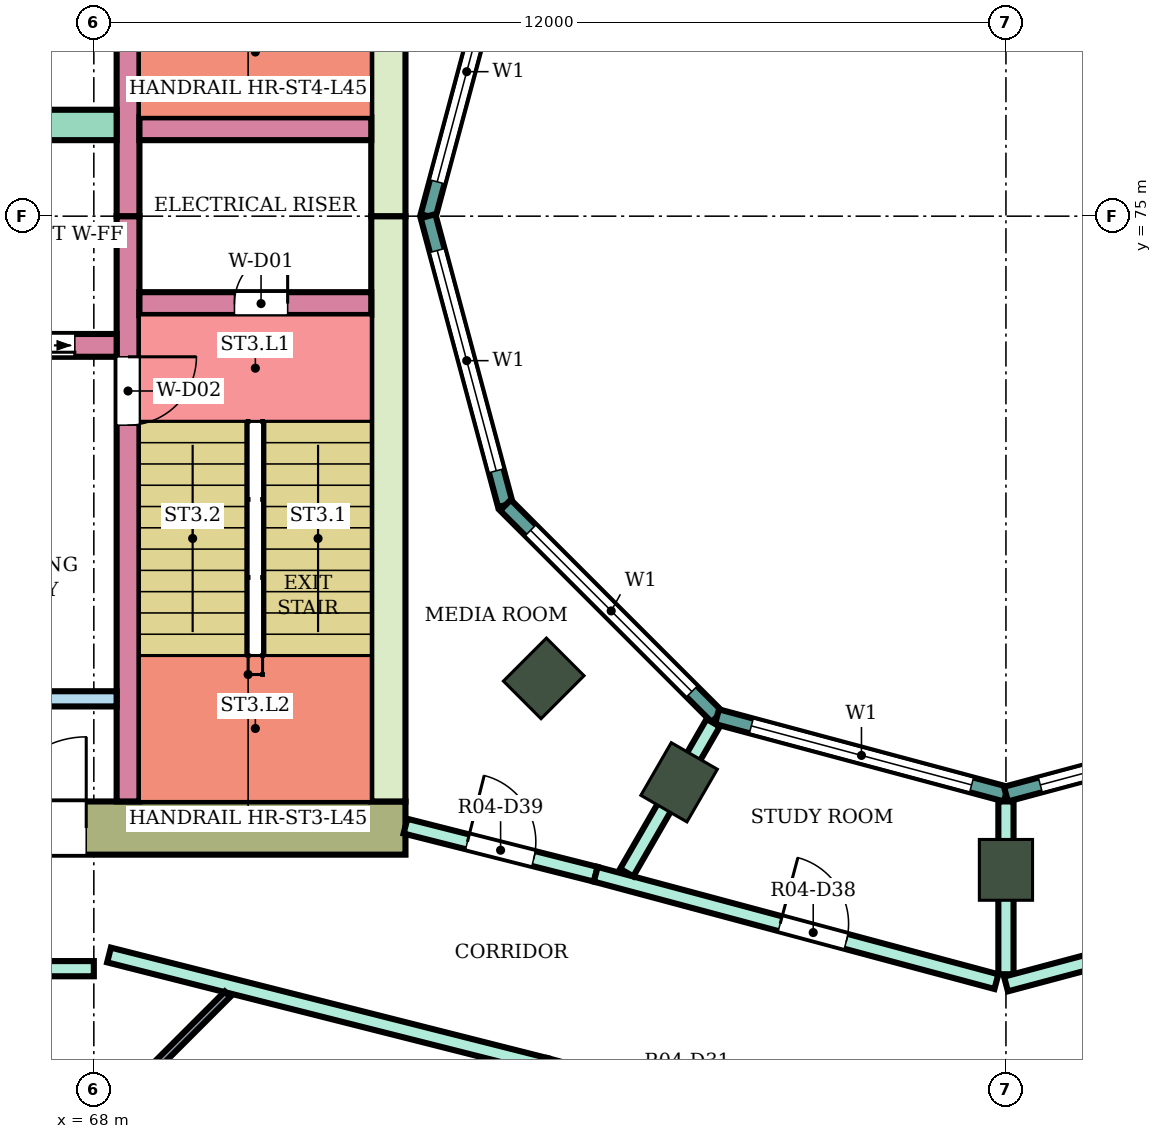
"""IFC4 building model, lengths in metres.
Left out: names, types, materials, properties, quantities, classifications, styles, units other than length and angle.
Written with IfcOpenShell. Run it as: python <this file> out.ifc"""

import sys

from ifc_helpers import new_model, si_unit, direction, frame, frame_2d, origin, origin_2d, place, context, subcontext, project, spatial, rectangle, extrude, element, fill, save


model = new_model("IFC4")
c1 = context("Model", 3, precision=1e-05, world=origin(), true_north=direction((0.0, 1.0)))
c2 = subcontext(c1, "Body", "Model", "MODEL_VIEW")
j1 = project(units=[si_unit("LENGTHUNIT", "METRE"), si_unit("PLANEANGLEUNIT", "RADIAN")], contexts=[c1])
p1 = place(None, origin())
s1 = spatial("IfcSite", under=j1, at=p1, CompositionType="ELEMENT")
p2 = place(p1, origin())
s2 = spatial("IfcBuilding", under=s1, at=p2, CompositionType="ELEMENT")
p3 = place(p2, frame((0.0, 0.0, 194.6)))
s3 = spatial("IfcBuildingStorey", under=s2, at=p3, CompositionType="ELEMENT", Elevation=194.6)
for number, where, z_axis, x_axis in (
    (1, (73.919, 68.919, 0.0), (0.0, 0.0, 1.0), (-0.707, -0.707, 0.0)),
    (2, (75.7, 67.552, 0.0), (0.0, 0.0, 1.0), (-0.5, -0.866, 0.0)),
    (3, (80.0, 66.4, 0.0), (0.0, 0.0, 1.0), (0.0, -1.0, 0.0)),
):
    element("IfcColumn", number, at=place(p3, frame(where, z_axis=z_axis, x_axis=x_axis)), inside=s3, PredefinedType="COLUMN", context=c2, shape_type="SweptSolid", body=[
        extrude(rectangle(XDim=0.8, YDim=0.7, at=origin_2d()), origin(), (0.0, 0.0, 1.0), 4.1),
    ])
p4 = place(p3, frame((72.1, 66.95, 0.0), z_axis=(0.0, 0.0, 1.0), x_axis=(-1.0, 0.0, 0.0)))
e4 = element("IfcWall", 4, at=p4, inside=s3, PredefinedType="SHEAR", context=c2, shape_type="SweptSolid", body=[
    extrude(rectangle(XDim=14.8, YDim=0.7, at=frame_2d((7.4, 0.0))), origin(), (0.0, 0.0, 1.0), 3.78),
])
p5 = place(p4, frame((4.2, 0.0, 0.0)))
e5 = element("IfcOpeningElement", 5, at=p5, cuts=e4, PredefinedType="OPENING", context=c2, shape_type="SweptSolid", body=[
    extrude(rectangle(XDim=2.4, YDim=2.4, at=frame_2d((1.2, 1.2))), frame((0.0, 0.36, 0.0), z_axis=(0.0, -1.0, 0.0), x_axis=(1.0, 0.0, 0.0)), (0.0, 0.0, 1.0), 0.72),
])
for number, where, z_axis, x_axis in (
    (6, (71.875, 75.0, 0.0), (0.0, 0.0, 1.0), (0.0, -1.0, 0.0)),
    (7, (71.875, 82.7, 0.0), (0.0, 0.0, 1.0), (0.0, -1.0, 0.0)),
):
    element("IfcWall", number, at=place(p3, frame(where, z_axis=z_axis, x_axis=x_axis)), inside=s3, PredefinedType="SHEAR", context=c2, shape_type="SweptSolid", body=[
        extrude(rectangle(XDim=7.7, YDim=0.45, at=frame_2d((3.85, 0.0))), origin(), (0.0, 0.0, 1.0), 3.78),
    ])
p6 = place(p3, frame((68.45, 75.0, 0.0), z_axis=(0.0, 0.0, 1.0), x_axis=(0.0, -1.0, 0.0)))
e8 = element("IfcWall", 8, at=p6, inside=s3, PredefinedType="SHEAR", context=c2, shape_type="SweptSolid", body=[
    extrude(rectangle(XDim=7.7, YDim=0.3, at=frame_2d((3.85, 0.0))), origin(), (0.0, 0.0, 1.0), 3.78),
])
p7 = place(p6, frame((1.85, 0.0, 0.0)))
e9 = element("IfcOpeningElement", 9, at=p7, cuts=e8, PredefinedType="OPENING", context=c2, shape_type="SweptSolid", body=[
    extrude(rectangle(XDim=0.9, YDim=2.1, at=frame_2d((0.45, 1.05))), frame((0.0, 0.16, 0.0), z_axis=(0.0, -1.0, 0.0), x_axis=(1.0, 0.0, 0.0)), (0.0, 0.0, 1.0), 0.32),
])
p8 = place(p3, frame((68.45, 82.7, 0.0), z_axis=(0.0, 0.0, 1.0), x_axis=(0.0, -1.0, 0.0)))
e10 = element("IfcWall", 10, at=p8, inside=s3, PredefinedType="SHEAR", context=c2, shape_type="SweptSolid", body=[
    extrude(rectangle(XDim=7.7, YDim=0.3, at=frame_2d((3.85, 0.0))), origin(), (0.0, 0.0, 1.0), 3.78),
])
p9 = place(p8, frame((0.35, 0.0, 0.0)))
e11 = element("IfcOpeningElement", 11, at=p9, cuts=e10, PredefinedType="OPENING", context=c2, shape_type="SweptSolid", body=[
    extrude(rectangle(XDim=0.9, YDim=2.1, at=frame_2d((0.45, 1.05))), frame((0.0, 0.16, 0.0), z_axis=(0.0, -1.0, 0.0), x_axis=(1.0, 0.0, 0.0)), (0.0, 0.0, 1.0), 0.32),
])
p10 = place(p3, frame((71.65, 73.85, 0.0), z_axis=(0.0, 0.0, 1.0), x_axis=(-1.0, 0.0, 0.0)))
e12 = element("IfcWall", 12, at=p10, inside=s3, PredefinedType="SHEAR", context=c2, shape_type="SweptSolid", body=[
    extrude(rectangle(XDim=3.05, YDim=0.3, at=frame_2d((1.525, 0.0))), origin(), (0.0, 0.0, 1.0), 3.78),
])
p11 = place(p10, frame((1.1, 0.0, 0.0)))
e13 = element("IfcOpeningElement", 13, at=p11, cuts=e12, PredefinedType="OPENING", context=c2, shape_type="SweptSolid", body=[
    extrude(rectangle(XDim=0.7, YDim=2.0, at=frame_2d((0.35, 1.0))), frame((0.0, 0.16, 0.0), z_axis=(0.0, -1.0, 0.0), x_axis=(1.0, 0.0, 0.0)), (0.0, 0.0, 1.0), 0.32),
])
p12 = place(p3, frame((71.65, 76.15, 0.0), z_axis=(0.0, 0.0, 1.0), x_axis=(-1.0, 0.0, 0.0)))
e14 = element("IfcWall", 14, at=p12, inside=s3, PredefinedType="SHEAR", context=c2, shape_type="SweptSolid", body=[
    extrude(rectangle(XDim=3.05, YDim=0.3, at=frame_2d((1.525, 0.0))), origin(), (0.0, 0.0, 1.0), 3.78),
])
p13 = place(p3, frame((68.3, 73.3, 0.0), z_axis=(0.0, 0.0, 1.0), x_axis=(-1.0, 0.0, 0.0)))
e15 = element("IfcWall", 15, at=p13, inside=s3, PredefinedType="SHEAR", context=c2, shape_type="SweptSolid", body=[
    extrude(rectangle(XDim=11.0, YDim=0.3, at=frame_2d((5.5, 0.0))), origin(), (0.0, 0.0, 1.0), 3.78),
])
p14 = place(p13, frame((0.55, 0.0, 0.0)))
e16 = element("IfcOpeningElement", 16, at=p14, cuts=e15, PredefinedType="OPENING", context=c2, shape_type="SweptSolid", body=[
    extrude(rectangle(XDim=1.1, YDim=2.1, at=frame_2d((0.55, 1.05))), frame((0.0, 0.16, 0.0), z_axis=(0.0, -1.0, 0.0), x_axis=(1.0, 0.0, 0.0)), (0.0, 0.0, 1.0), 0.32),
])
p15 = place(p13, frame((3.0, 0.0, 0.0)))
e17 = element("IfcOpeningElement", 17, at=p15, cuts=e15, PredefinedType="OPENING", context=c2, shape_type="SweptSolid", body=[
    extrude(rectangle(XDim=1.2, YDim=2.1, at=frame_2d((0.6, 1.05))), frame((0.0, 0.16, 0.0), z_axis=(0.0, -1.0, 0.0), x_axis=(1.0, 0.0, 0.0)), (0.0, 0.0, 1.0), 0.32),
])
p16 = place(p13, frame((5.5, 0.0, 0.0)))
e18 = element("IfcOpeningElement", 18, at=p16, cuts=e15, PredefinedType="OPENING", context=c2, shape_type="SweptSolid", body=[
    extrude(rectangle(XDim=1.2, YDim=2.1, at=frame_2d((0.6, 1.05))), frame((0.0, 0.16, 0.0), z_axis=(0.0, -1.0, 0.0), x_axis=(1.0, 0.0, 0.0)), (0.0, 0.0, 1.0), 0.32),
])
p17 = place(p13, frame((8.8, 0.0, 0.0)))
e19 = element("IfcOpeningElement", 19, at=p17, cuts=e15, PredefinedType="OPENING", context=c2, shape_type="SweptSolid", body=[
    extrude(rectangle(XDim=0.9, YDim=2.1, at=frame_2d((0.45, 1.05))), frame((0.0, 0.16, 0.0), z_axis=(0.0, -1.0, 0.0), x_axis=(1.0, 0.0, 0.0)), (0.0, 0.0, 1.0), 0.32),
])
p18 = place(p3, frame((68.3, 76.2, 0.0), z_axis=(0.0, 0.0, 1.0), x_axis=(-1.0, 0.0, 0.0)))
e20 = element("IfcWall", 20, at=p18, inside=s3, PredefinedType="SHEAR", context=c2, shape_type="SweptSolid", body=[
    extrude(rectangle(XDim=11.0, YDim=0.4, at=frame_2d((5.5, 0.0))), origin(), (0.0, 0.0, 1.0), 3.78),
])
p19 = place(p3, frame((68.3, 68.65, 0.0), z_axis=(0.0, 0.0, 1.0), x_axis=(-1.0, 0.0, 0.0)))
e21 = element("IfcWall", 21, at=p19, inside=s3, PredefinedType="SHEAR", context=c2, shape_type="SweptSolid", body=[
    extrude(rectangle(XDim=4.5, YDim=0.2, at=frame_2d((2.25, 0.0))), origin(), (0.0, 0.0, 1.0), 3.78),
])
p20 = place(p3, frame((73.415, 78.802, 0.0), z_axis=(0.0, 0.0, 1.0), x_axis=(-0.258789828301, -0.965933654434, 0.0)))
e22 = element("IfcWall", 22, at=p20, inside=s3, PredefinedType="NOTDEFINED", context=c2, shape_type="SweptSolid", body=[
    extrude(rectangle(XDim=3.936, YDim=0.2, at=frame_2d((1.968, 0.0))), origin(), (0.0, 0.0, 1.0), 4.1),
])
p21 = place(p20, frame((0.468, 0.0, 0.9)))
e23 = element("IfcOpeningElement", 23, at=p21, cuts=e22, PredefinedType="OPENING", context=c2, shape_type="SweptSolid", body=[
    extrude(rectangle(XDim=3.0, YDim=2.3, at=frame_2d((1.5, 1.15))), frame((0.0, 0.11, 0.0), z_axis=(0.0, -1.0, 0.0), x_axis=(1.0, 0.0, 0.0)), (0.0, 0.0, 1.0), 0.22),
])
p22 = place(p3, frame((72.396, 75.0, 0.0), z_axis=(0.0, 0.0, 1.0), x_axis=(0.258789828301, -0.965933654434, 0.0)))
e24 = element("IfcWall", 24, at=p22, inside=s3, PredefinedType="NOTDEFINED", context=c2, shape_type="SweptSolid", body=[
    extrude(rectangle(XDim=3.936, YDim=0.2, at=frame_2d((1.968, 0.0))), origin(), (0.0, 0.0, 1.0), 4.1),
])
p23 = place(p22, frame((0.468, 0.0, 0.9)))
e25 = element("IfcOpeningElement", 25, at=p23, cuts=e24, PredefinedType="OPENING", context=c2, shape_type="SweptSolid", body=[
    extrude(rectangle(XDim=3.0, YDim=2.3, at=frame_2d((1.5, 1.15))), frame((0.0, 0.11, 0.0), z_axis=(0.0, -1.0, 0.0), x_axis=(1.0, 0.0, 0.0)), (0.0, 0.0, 1.0), 0.22),
])
p24 = place(p3, frame((73.415, 71.198, 0.0), z_axis=(0.0, 0.0, 1.0), x_axis=(0.707106781187, -0.707106781187, 0.0)))
e26 = element("IfcWall", 26, at=p24, inside=s3, PredefinedType="NOTDEFINED", context=c2, shape_type="SweptSolid", body=[
    extrude(rectangle(XDim=3.936, YDim=0.2, at=frame_2d((1.968, 0.0))), origin(), (0.0, 0.0, 1.0), 4.1),
])
p25 = place(p24, frame((0.468, 0.0, 0.9)))
e27 = element("IfcOpeningElement", 27, at=p25, cuts=e26, PredefinedType="OPENING", context=c2, shape_type="SweptSolid", body=[
    extrude(rectangle(XDim=3.0, YDim=2.3, at=frame_2d((1.5, 1.15))), frame((0.0, 0.11, 0.0), z_axis=(0.0, -1.0, 0.0), x_axis=(1.0, 0.0, 0.0)), (0.0, 0.0, 1.0), 0.22),
])
p26 = place(p3, frame((76.198, 68.415, 0.0), z_axis=(0.0, 0.0, 1.0), x_axis=(0.965933654434, -0.258789828301, 0.0)))
e28 = element("IfcWall", 28, at=p26, inside=s3, PredefinedType="NOTDEFINED", context=c2, shape_type="SweptSolid", body=[
    extrude(rectangle(XDim=3.936, YDim=0.2, at=frame_2d((1.968, 0.0))), origin(), (0.0, 0.0, 1.0), 4.1),
])
p27 = place(p26, frame((0.468, 0.0, 0.9)))
e29 = element("IfcOpeningElement", 29, at=p27, cuts=e28, PredefinedType="OPENING", context=c2, shape_type="SweptSolid", body=[
    extrude(rectangle(XDim=3.0, YDim=2.3, at=frame_2d((1.5, 1.15))), frame((0.0, 0.11, 0.0), z_axis=(0.0, -1.0, 0.0), x_axis=(1.0, 0.0, 0.0)), (0.0, 0.0, 1.0), 0.22),
])
p28 = place(p3, frame((80.0, 67.396, 0.0), z_axis=(0.0, 0.0, 1.0), x_axis=(0.965933654434, 0.258789828301, 0.0)))
e30 = element("IfcWall", 30, at=p28, inside=s3, PredefinedType="NOTDEFINED", context=c2, shape_type="SweptSolid", body=[
    extrude(rectangle(XDim=3.936, YDim=0.2, at=frame_2d((1.968, 0.0))), origin(), (0.0, 0.0, 1.0), 4.1),
])
p29 = place(p28, frame((0.468, 0.0, 0.9)))
e31 = element("IfcOpeningElement", 31, at=p29, cuts=e30, PredefinedType="OPENING", context=c2, shape_type="SweptSolid", body=[
    extrude(rectangle(XDim=3.0, YDim=2.3, at=frame_2d((1.5, 1.15))), frame((0.0, 0.11, 0.0), z_axis=(0.0, -1.0, 0.0), x_axis=(1.0, 0.0, 0.0)), (0.0, 0.0, 1.0), 0.22),
])
p30 = place(p3, frame((65.2, 65.1, 0.0), z_axis=(0.0, 0.0, 1.0), x_axis=(1.0, 0.0, 0.0)))
e32 = element("IfcWall", 32, at=p30, inside=s3, PredefinedType="PARTITIONING", context=c2, shape_type="SweptSolid", body=[
    extrude(rectangle(XDim=2.8, YDim=0.2, at=frame_2d((1.4, 0.0))), origin(), (0.0, 0.0, 1.0), 3.65),
])
p31 = place(p3, frame((68.2, 65.28, 0.0), z_axis=(0.0, 0.0, 1.0), x_axis=(0.969450596516, -0.245286650503, 0.0)))
e33 = element("IfcWall", 33, at=p31, inside=s3, PredefinedType="PARTITIONING", context=c2, shape_type="SweptSolid", body=[
    extrude(rectangle(XDim=5.928, YDim=0.2, at=frame_2d((2.964, 0.0))), origin(), (0.0, 0.0, 1.0), 3.65),
])
p32 = place(p3, frame((72.1, 66.975, 0.0), z_axis=(0.0, 0.0, 1.0), x_axis=(0.969471314457, -0.245204752086, 0.0)))
e34 = element("IfcWall", 34, at=p32, inside=s3, PredefinedType="PARTITIONING", context=c2, shape_type="SweptSolid", body=[
    extrude(rectangle(XDim=2.582, YDim=0.2, at=frame_2d((1.291, 0.0))), origin(), (0.0, 0.0, 1.0), 3.65),
])
p33 = place(p32, frame((0.841, 0.0, 0.0)))
e35 = element("IfcOpeningElement", 35, at=p33, cuts=e34, PredefinedType="OPENING", context=c2, shape_type="SweptSolid", body=[
    extrude(rectangle(XDim=0.9, YDim=2.1, at=frame_2d((0.45, 1.05))), frame((0.0, 0.11, 0.0), z_axis=(0.0, -1.0, 0.0), x_axis=(1.0, 0.0, 0.0)), (0.0, 0.0, 1.0), 0.22),
])
p34 = place(p3, frame((73.947, 63.826, 0.0), z_axis=(0.0, 0.0, 1.0), x_axis=(0.965908253407, -0.258884619088, 0.0)))
e36 = element("IfcWall", 36, at=p34, inside=s3, PredefinedType="PARTITIONING", context=c2, shape_type="SweptSolid", body=[
    extrude(rectangle(XDim=6.217, YDim=0.2, at=frame_2d((3.108, 0.0))), origin(), (0.0, 0.0, 1.0), 3.65),
])
p35 = place(p34, frame((1.424, 0.0, 0.0)))
e37 = element("IfcOpeningElement", 37, at=p35, cuts=e36, PredefinedType="OPENING", context=c2, shape_type="SweptSolid", body=[
    extrude(rectangle(XDim=1.0, YDim=2.1, at=frame_2d((0.5, 1.05))), frame((0.0, 0.11, 0.0), z_axis=(0.0, -1.0, 0.0), x_axis=(1.0, 0.0, 0.0)), (0.0, 0.0, 1.0), 0.22),
])
p36 = place(p3, frame((74.603, 66.342, 0.0), z_axis=(0.0, 0.0, 1.0), x_axis=(0.965920893652, -0.258837453254, 0.0)))
e38 = element("IfcWall", 38, at=p36, inside=s3, PredefinedType="PARTITIONING", context=c2, shape_type="SweptSolid", body=[
    extrude(rectangle(XDim=5.458, YDim=0.2, at=frame_2d((2.729, 0.0))), origin(), (0.0, 0.0, 1.0), 3.65),
])
p37 = place(p36, frame((2.512, 0.0, 0.0)))
e39 = element("IfcOpeningElement", 39, at=p37, cuts=e38, PredefinedType="OPENING", context=c2, shape_type="SweptSolid", body=[
    extrude(rectangle(XDim=0.9, YDim=2.1, at=frame_2d((0.45, 1.05))), frame((0.0, 0.11, 0.0), z_axis=(0.0, -1.0, 0.0), x_axis=(1.0, 0.0, 0.0)), (0.0, 0.0, 1.0), 0.22),
])
p38 = place(p3, frame((75.01, 66.364, 0.0), z_axis=(0.0, 0.0, 1.0), x_axis=(0.500097042406, 0.865969369075, 0.0)))
e40 = element("IfcWall", 40, at=p38, inside=s3, PredefinedType="PARTITIONING", context=c2, shape_type="SweptSolid", body=[
    extrude(rectangle(XDim=2.275, YDim=0.2, at=frame_2d((1.138, 0.0))), origin(), (0.0, 0.0, 1.0), 3.65),
])
p39 = place(p3, frame((80.048, 62.217, 0.0), z_axis=(0.0, 0.0, 1.0), x_axis=(0.966097920642, 0.258175923996, 0.0)))
e41 = element("IfcWall", 41, at=p39, inside=s3, PredefinedType="PARTITIONING", context=c2, shape_type="SweptSolid", body=[
    extrude(rectangle(XDim=6.217, YDim=0.2, at=frame_2d((3.108, 0.0))), origin(), (0.0, 0.0, 1.0), 3.65),
])
p40 = place(p39, frame((3.792, 0.0, 0.0)))
e42 = element("IfcOpeningElement", 42, at=p40, cuts=e41, PredefinedType="OPENING", context=c2, shape_type="SweptSolid", body=[
    extrude(rectangle(XDim=1.0, YDim=2.1, at=frame_2d((0.5, 1.05))), frame((0.0, 0.11, 0.0), z_axis=(0.0, -1.0, 0.0), x_axis=(1.0, 0.0, 0.0)), (0.0, 0.0, 1.0), 0.22),
])
p41 = place(p3, frame((80.0, 65.027, 0.0), z_axis=(0.0, 0.0, 1.0), x_axis=(0.0, 1.0, 0.0)))
e43 = element("IfcWall", 43, at=p41, inside=s3, PredefinedType="PARTITIONING", context=c2, shape_type="SweptSolid", body=[
    extrude(rectangle(XDim=2.273, YDim=0.2, at=frame_2d((1.136, 0.0))), origin(), (0.0, 0.0, 1.0), 3.65),
])
p42 = place(p3, frame((80.0, 64.898, 0.0), z_axis=(0.0, 0.0, 1.0), x_axis=(0.966236923997, 0.25765520896, 0.0)))
e44 = element("IfcWall", 44, at=p42, inside=s3, PredefinedType="PARTITIONING", context=c2, shape_type="SweptSolid", body=[
    extrude(rectangle(XDim=8.168, YDim=0.2, at=frame_2d((4.084, 0.0))), origin(), (0.0, 0.0, 1.0), 3.65),
])
p43 = place(p42, frame((1.893, 0.0, 0.0)))
e45 = element("IfcOpeningElement", 45, at=p43, cuts=e44, PredefinedType="OPENING", context=c2, shape_type="SweptSolid", body=[
    extrude(rectangle(XDim=1.8, YDim=2.1, at=frame_2d((0.9, 1.05))), frame((0.0, 0.11, 0.0), z_axis=(0.0, -1.0, 0.0), x_axis=(1.0, 0.0, 0.0)), (0.0, 0.0, 1.0), 0.22),
])
p44 = place(p3, frame((63.592, 58.6, 0.0), z_axis=(0.0, 0.0, 1.0), x_axis=(0.707260766325, 0.706952762508, 0.0)))
e46 = element("IfcWall", 46, at=p44, inside=s3, PredefinedType="PARTITIONING", context=c2, shape_type="SweptSolid", body=[
    extrude(rectangle(XDim=8.719, YDim=0.1, at=frame_2d((4.36, 0.0))), origin(), (0.0, 0.0, 1.0), 3.65),
])
p45 = place(p44, frame((1.772, 0.0, 0.0)))
e47 = element("IfcOpeningElement", 47, at=p45, cuts=e46, PredefinedType="OPENING", context=c2, shape_type="SweptSolid", body=[
    extrude(rectangle(XDim=0.9, YDim=2.1, at=frame_2d((0.45, 1.05))), frame((0.0, 0.06, 0.0), z_axis=(0.0, -1.0, 0.0), x_axis=(1.0, 0.0, 0.0)), (0.0, 0.0, 1.0), 0.12),
])
p46 = place(p21, origin())
e48 = element("IfcWindow", 48, at=p46, inside=s3, PartitioningType="SINGLE_PANEL", PredefinedType="WINDOW", context=c2, shape_type="SweptSolid", body=[
    extrude(rectangle(XDim=3.0, YDim=2.3, at=frame_2d((1.5, 1.15))), frame((0.0, 0.03, 0.0), z_axis=(0.0, -1.0, 0.0), x_axis=(1.0, 0.0, 0.0)), (0.0, 0.0, 1.0), 0.06),
])
fill(e23, e48)
p47 = place(p23, origin())
e49 = element("IfcWindow", 49, at=p47, inside=s3, PartitioningType="SINGLE_PANEL", PredefinedType="WINDOW", context=c2, shape_type="SweptSolid", body=[
    extrude(rectangle(XDim=3.0, YDim=2.3, at=frame_2d((1.5, 1.15))), frame((0.0, 0.03, 0.0), z_axis=(0.0, -1.0, 0.0), x_axis=(1.0, 0.0, 0.0)), (0.0, 0.0, 1.0), 0.06),
])
fill(e25, e49)
p48 = place(p25, origin())
e50 = element("IfcWindow", 50, at=p48, inside=s3, PartitioningType="SINGLE_PANEL", PredefinedType="WINDOW", context=c2, shape_type="SweptSolid", body=[
    extrude(rectangle(XDim=3.0, YDim=2.3, at=frame_2d((1.5, 1.15))), frame((0.0, 0.03, 0.0), z_axis=(0.0, -1.0, 0.0), x_axis=(1.0, 0.0, 0.0)), (0.0, 0.0, 1.0), 0.06),
])
fill(e27, e50)
p49 = place(p27, origin())
e51 = element("IfcWindow", 51, at=p49, inside=s3, PartitioningType="SINGLE_PANEL", PredefinedType="WINDOW", context=c2, shape_type="SweptSolid", body=[
    extrude(rectangle(XDim=3.0, YDim=2.3, at=frame_2d((1.5, 1.15))), frame((0.0, 0.03, 0.0), z_axis=(0.0, -1.0, 0.0), x_axis=(1.0, 0.0, 0.0)), (0.0, 0.0, 1.0), 0.06),
])
fill(e29, e51)
p50 = place(p29, origin())
e52 = element("IfcWindow", 52, at=p50, inside=s3, PartitioningType="SINGLE_PANEL", PredefinedType="WINDOW", context=c2, shape_type="SweptSolid", body=[
    extrude(rectangle(XDim=3.0, YDim=2.3, at=frame_2d((1.5, 1.15))), frame((0.0, 0.03, 0.0), z_axis=(0.0, -1.0, 0.0), x_axis=(1.0, 0.0, 0.0)), (0.0, 0.0, 1.0), 0.06),
])
fill(e31, e52)
p51 = place(p37, origin())
e53 = element("IfcDoor", 53, at=p51, inside=s3, OperationType="SINGLE_SWING_LEFT", PredefinedType="DOOR", context=c2, shape_type="SweptSolid", body=[
    extrude(rectangle(XDim=0.9, YDim=2.1, at=frame_2d((0.45, 1.05))), frame((0.0, 0.025, 0.0), z_axis=(0.0, -1.0, 0.0), x_axis=(1.0, 0.0, 0.0)), (0.0, 0.0, 1.0), 0.05),
])
fill(e39, e53)
p52 = place(p33, origin())
e54 = element("IfcDoor", 54, at=p52, inside=s3, OperationType="SINGLE_SWING_LEFT", PredefinedType="DOOR", context=c2, shape_type="SweptSolid", body=[
    extrude(rectangle(XDim=0.9, YDim=2.1, at=frame_2d((0.45, 1.05))), frame((0.0, 0.025, 0.0), z_axis=(0.0, -1.0, 0.0), x_axis=(1.0, 0.0, 0.0)), (0.0, 0.0, 1.0), 0.05),
])
fill(e35, e54)
p53 = place(p11, frame((0.7, 0.0, 0.0), z_axis=(0.0, 0.0, 1.0), x_axis=(-1.0, 0.0, 0.0)))
e55 = element("IfcDoor", 55, at=p53, inside=s3, OperationType="SINGLE_SWING_RIGHT", PredefinedType="DOOR", context=c2, shape_type="SweptSolid", body=[
    extrude(rectangle(XDim=0.7, YDim=2.0, at=frame_2d((0.35, 1.0))), frame((0.0, 0.025, 0.0), z_axis=(0.0, -1.0, 0.0), x_axis=(1.0, 0.0, 0.0)), (0.0, 0.0, 1.0), 0.05),
])
fill(e13, e55)
p54 = place(p7, origin())
e56 = element("IfcDoor", 56, at=p54, inside=s3, OperationType="SINGLE_SWING_LEFT", PredefinedType="DOOR", context=c2, shape_type="SweptSolid", body=[
    extrude(rectangle(XDim=0.9, YDim=2.1, at=frame_2d((0.45, 1.05))), frame((0.0, 0.025, 0.0), z_axis=(0.0, -1.0, 0.0), x_axis=(1.0, 0.0, 0.0)), (0.0, 0.0, 1.0), 0.05),
])
fill(e9, e56)
p55 = place(p14, origin())
e57 = element("IfcDoor", 57, at=p55, inside=s3, OperationType="DOUBLE_DOOR_SLIDING", PredefinedType="DOOR", context=c2, shape_type="SweptSolid", body=[
    extrude(rectangle(XDim=1.1, YDim=2.1, at=frame_2d((0.55, 1.05))), frame((0.0, 0.025, 0.0), z_axis=(0.0, -1.0, 0.0), x_axis=(1.0, 0.0, 0.0)), (0.0, 0.0, 1.0), 0.05),
])
fill(e16, e57)
p56 = place(p5, frame((2.4, 0.0, 0.0), z_axis=(0.0, 0.0, 1.0), x_axis=(-1.0, 0.0, 0.0)))
e58 = element("IfcDoor", 58, at=p56, inside=s3, OperationType="DOUBLE_DOOR_SINGLE_SWING", PredefinedType="DOOR", context=c2, shape_type="SweptSolid", body=[
    extrude(rectangle(XDim=2.4, YDim=2.4, at=frame_2d((1.2, 1.2))), frame((0.0, 0.025, 0.0), z_axis=(0.0, -1.0, 0.0), x_axis=(1.0, 0.0, 0.0)), (0.0, 0.0, 1.0), 0.05),
])
fill(e5, e58)
save(model, sys.argv[1])
